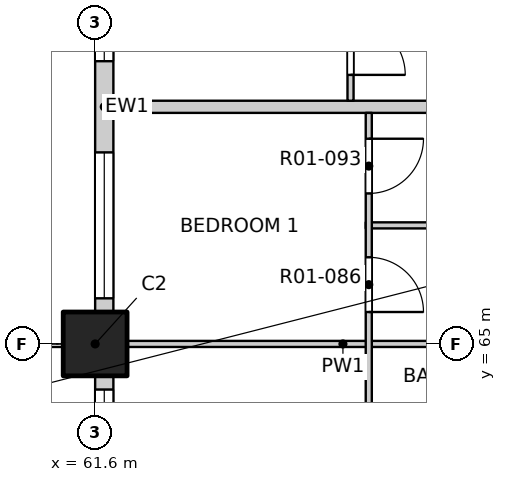
"""IFC4 building model, lengths in metres.
Left out: names, types, materials, properties, quantities, classifications, styles, units other than length and angle.
Written with IfcOpenShell. Run it as: python <this file> out.ifc"""

import sys

from ifc_helpers import new_model, si_unit, direction, frame, frame_2d, origin, origin_2d, place, context, subcontext, project, spatial, rectangle, extrude, element, fill, save


model = new_model("IFC4")
c1 = context("Model", 3, precision=1e-05, world=origin(), true_north=direction((0.0, 1.0)))
c2 = subcontext(c1, "Body", "Model", "MODEL_VIEW")
j1 = project(units=[si_unit("LENGTHUNIT", "METRE"), si_unit("PLANEANGLEUNIT", "RADIAN")], contexts=[c1])
p1 = place(None, origin())
s1 = spatial("IfcSite", under=j1, at=p1, CompositionType="ELEMENT")
p2 = place(p1, origin())
s2 = spatial("IfcBuilding", under=s1, at=p2, CompositionType="ELEMENT")
p3 = place(p2, frame((0.0, 0.0, 26.3)))
s3 = spatial("IfcBuildingStorey", under=s2, at=p3, CompositionType="ELEMENT", Elevation=26.3)
p4 = place(p3, frame((61.6, 65.0, -0.25), z_axis=(0.0, 0.0, 1.0), x_axis=(1.0, 0.0, 0.0)))
e1 = element("IfcColumn", 1, at=p4, inside=s3, PredefinedType="COLUMN", context=c2, shape_type="SweptSolid", body=[
    extrude(rectangle(XDim=1.05, YDim=1.05, at=origin_2d()), origin(), (0.0, 0.0, 1.0), 3.4),
])
p5 = place(p3, frame((61.75, 57.725, 0.0), z_axis=(0.0, 0.0, 1.0), x_axis=(0.0, 1.0, 0.0)))
e2 = element("IfcWall", 2, at=p5, inside=s3, PredefinedType="SOLIDWALL", context=c2, shape_type="SweptSolid", body=[
    extrude(rectangle(XDim=6.75, YDim=0.3, at=frame_2d((3.375, 0.0))), origin(), (0.0, 0.0, 1.0), 2.7),
])
p6 = place(p5, frame((0.525, 0.0, 0.0)))
e3 = element("IfcOpeningElement", 3, at=p6, cuts=e2, PredefinedType="OPENING", context=c2, shape_type="SweptSolid", body=[
    extrude(rectangle(XDim=1.8, YDim=2.4, at=frame_2d((0.9, 1.2))), frame((0.0, 0.16, 0.0), z_axis=(0.0, -1.0, 0.0), x_axis=(1.0, 0.0, 0.0)), (0.0, 0.0, 1.0), 0.32),
])
p7 = place(p5, frame((4.125, 0.0, 0.9)))
e4 = element("IfcOpeningElement", 4, at=p7, cuts=e2, PredefinedType="OPENING", context=c2, shape_type="SweptSolid", body=[
    extrude(rectangle(XDim=2.4, YDim=1.8, at=frame_2d((1.2, 0.9))), frame((0.0, 0.16, 0.0), z_axis=(0.0, -1.0, 0.0), x_axis=(1.0, 0.0, 0.0)), (0.0, 0.0, 1.0), 0.32),
])
p8 = place(p3, frame((61.75, 65.525, 0.0), z_axis=(0.0, 0.0, 1.0), x_axis=(0.0, 1.0, 0.0)))
e5 = element("IfcWall", 5, at=p8, inside=s3, PredefinedType="SOLIDWALL", context=c2, shape_type="SweptSolid", body=[
    extrude(rectangle(XDim=6.75, YDim=0.3, at=frame_2d((3.375, 0.0))), origin(), (0.0, 0.0, 1.0), 2.7),
])
p9 = place(p8, frame((0.225, 0.0, 0.9)))
e6 = element("IfcOpeningElement", 6, at=p9, cuts=e5, PredefinedType="OPENING", context=c2, shape_type="SweptSolid", body=[
    extrude(rectangle(XDim=2.4, YDim=1.8, at=frame_2d((1.2, 0.9))), frame((0.0, 0.16, 0.0), z_axis=(0.0, -1.0, 0.0), x_axis=(1.0, 0.0, 0.0)), (0.0, 0.0, 1.0), 0.32),
])
p10 = place(p8, frame((4.125, 0.0, 0.9)))
e7 = element("IfcOpeningElement", 7, at=p10, cuts=e5, PredefinedType="OPENING", context=c2, shape_type="SweptSolid", body=[
    extrude(rectangle(XDim=2.4, YDim=1.8, at=frame_2d((1.2, 0.9))), frame((0.0, 0.16, 0.0), z_axis=(0.0, -1.0, 0.0), x_axis=(1.0, 0.0, 0.0)), (0.0, 0.0, 1.0), 0.32),
])
p11 = place(p3, frame((61.9, 65.0, 0.0), z_axis=(0.0, 0.0, 1.0), x_axis=(1.0, 0.0, 0.0)))
e8 = element("IfcWall", 8, at=p11, inside=s3, PredefinedType="PARTITIONING", context=c2, shape_type="SweptSolid", body=[
    extrude(rectangle(XDim=7.55, YDim=0.1, at=frame_2d((3.775, 0.0))), origin(), (0.0, 0.0, 1.0), 2.55),
])
p12 = place(p3, frame((66.05, 66.95, 0.0), z_axis=(0.0, 0.0, 1.0), x_axis=(1.0, 0.0, 0.0)))
e9 = element("IfcWall", 9, at=p12, inside=s3, PredefinedType="PARTITIONING", context=c2, shape_type="SweptSolid", body=[
    extrude(rectangle(XDim=3.4, YDim=0.1, at=frame_2d((1.7, 0.0))), origin(), (0.0, 0.0, 1.0), 3.15),
])
p13 = place(p3, frame((61.9, 68.9, 0.0), z_axis=(0.0, 0.0, 1.0), x_axis=(1.0, 0.0, 0.0)))
e10 = element("IfcWall", 10, at=p13, inside=s3, PredefinedType="PARTITIONING", context=c2, shape_type="SweptSolid", body=[
    extrude(rectangle(XDim=11.5, YDim=0.2, at=frame_2d((5.75, 0.0))), origin(), (0.0, 0.0, 1.0), 3.15),
])
p14 = place(p3, frame((65.8, 69.0, 0.0), z_axis=(0.0, 0.0, 1.0), x_axis=(0.0, 1.0, 0.0)))
e11 = element("IfcWall", 11, at=p14, inside=s3, PredefinedType="PARTITIONING", context=c2, shape_type="SweptSolid", body=[
    extrude(rectangle(XDim=7.6, YDim=0.1, at=frame_2d((3.8, 0.0))), origin(), (0.0, 0.0, 1.0), 3.15),
])
p15 = place(p14, frame((0.425, 0.0, 0.0)))
e12 = element("IfcOpeningElement", 12, at=p15, cuts=e11, PredefinedType="OPENING", context=c2, shape_type="SweptSolid", body=[
    extrude(rectangle(XDim=0.9, YDim=2.1, at=frame_2d((0.45, 1.05))), frame((0.0, 0.06, 0.0), z_axis=(0.0, -1.0, 0.0), x_axis=(1.0, 0.0, 0.0)), (0.0, 0.0, 1.0), 0.12),
])
p16 = place(p14, frame((2.375, 0.0, 0.0)))
e13 = element("IfcOpeningElement", 13, at=p16, cuts=e11, PredefinedType="OPENING", context=c2, shape_type="SweptSolid", body=[
    extrude(rectangle(XDim=0.9, YDim=2.1, at=frame_2d((0.45, 1.05))), frame((0.0, 0.06, 0.0), z_axis=(0.0, -1.0, 0.0), x_axis=(1.0, 0.0, 0.0)), (0.0, 0.0, 1.0), 0.12),
])
p17 = place(p14, frame((5.15, 0.0, 0.0)))
e14 = element("IfcOpeningElement", 14, at=p17, cuts=e11, PredefinedType="OPENING", context=c2, shape_type="SweptSolid", body=[
    extrude(rectangle(XDim=1.2, YDim=2.1, at=frame_2d((0.6, 1.05))), frame((0.0, 0.06, 0.0), z_axis=(0.0, -1.0, 0.0), x_axis=(1.0, 0.0, 0.0)), (0.0, 0.0, 1.0), 0.12),
])
p18 = place(p3, frame((66.1, 61.2, 0.0), z_axis=(0.0, 0.0, 1.0), x_axis=(0.0, 1.0, 0.0)))
e15 = element("IfcWall", 15, at=p18, inside=s3, PredefinedType="PARTITIONING", context=c2, shape_type="SweptSolid", body=[
    extrude(rectangle(XDim=7.6, YDim=0.1, at=frame_2d((3.8, 0.0))), origin(), (0.0, 0.0, 1.0), 3.15),
])
p19 = place(p18, frame((1.25, 0.0, 0.0)))
e16 = element("IfcOpeningElement", 16, at=p19, cuts=e15, PredefinedType="OPENING", context=c2, shape_type="SweptSolid", body=[
    extrude(rectangle(XDim=1.2, YDim=2.1, at=frame_2d((0.6, 1.05))), frame((0.0, 0.06, 0.0), z_axis=(0.0, -1.0, 0.0), x_axis=(1.0, 0.0, 0.0)), (0.0, 0.0, 1.0), 0.12),
])
p20 = place(p18, frame((4.325, 0.0, 0.0)))
e17 = element("IfcOpeningElement", 17, at=p20, cuts=e15, PredefinedType="OPENING", context=c2, shape_type="SweptSolid", body=[
    extrude(rectangle(XDim=0.9, YDim=2.1, at=frame_2d((0.45, 1.05))), frame((0.0, 0.06, 0.0), z_axis=(0.0, -1.0, 0.0), x_axis=(1.0, 0.0, 0.0)), (0.0, 0.0, 1.0), 0.12),
])
p21 = place(p18, frame((6.275, 0.0, 0.0)))
e18 = element("IfcOpeningElement", 18, at=p21, cuts=e15, PredefinedType="OPENING", context=c2, shape_type="SweptSolid", body=[
    extrude(rectangle(XDim=0.9, YDim=2.1, at=frame_2d((0.45, 1.05))), frame((0.0, 0.06, 0.0), z_axis=(0.0, -1.0, 0.0), x_axis=(1.0, 0.0, 0.0)), (0.0, 0.0, 1.0), 0.12),
])
p22 = place(p7, origin())
e19 = element("IfcWindow", 19, at=p22, inside=s3, PartitioningType="DOUBLE_PANEL_VERTICAL", PredefinedType="WINDOW", context=c2, shape_type="SweptSolid", body=[
    extrude(rectangle(XDim=2.4, YDim=1.8, at=frame_2d((1.2, 0.9))), frame((0.0, 0.03, 0.0), z_axis=(0.0, -1.0, 0.0), x_axis=(1.0, 0.0, 0.0)), (0.0, 0.0, 1.0), 0.06),
])
fill(e4, e19)
p23 = place(p9, origin())
e20 = element("IfcWindow", 20, at=p23, inside=s3, PartitioningType="DOUBLE_PANEL_VERTICAL", PredefinedType="WINDOW", context=c2, shape_type="SweptSolid", body=[
    extrude(rectangle(XDim=2.4, YDim=1.8, at=frame_2d((1.2, 0.9))), frame((0.0, 0.03, 0.0), z_axis=(0.0, -1.0, 0.0), x_axis=(1.0, 0.0, 0.0)), (0.0, 0.0, 1.0), 0.06),
])
fill(e6, e20)
p24 = place(p10, origin())
e21 = element("IfcWindow", 21, at=p24, inside=s3, PartitioningType="DOUBLE_PANEL_VERTICAL", PredefinedType="WINDOW", context=c2, shape_type="SweptSolid", body=[
    extrude(rectangle(XDim=2.4, YDim=1.8, at=frame_2d((1.2, 0.9))), frame((0.0, 0.03, 0.0), z_axis=(0.0, -1.0, 0.0), x_axis=(1.0, 0.0, 0.0)), (0.0, 0.0, 1.0), 0.06),
])
fill(e7, e21)
p25 = place(p20, origin())
e22 = element("IfcDoor", 22, at=p25, inside=s3, OperationType="SINGLE_SWING_RIGHT", PredefinedType="DOOR", context=c2, shape_type="SweptSolid", body=[
    extrude(rectangle(XDim=0.9, YDim=2.1, at=frame_2d((0.45, 1.05))), frame((0.0, 0.025, 0.0), z_axis=(0.0, -1.0, 0.0), x_axis=(1.0, 0.0, 0.0)), (0.0, 0.0, 1.0), 0.05),
])
fill(e17, e22)
p26 = place(p21, origin())
e23 = element("IfcDoor", 23, at=p26, inside=s3, OperationType="SINGLE_SWING_LEFT", PredefinedType="DOOR", context=c2, shape_type="SweptSolid", body=[
    extrude(rectangle(XDim=0.9, YDim=2.1, at=frame_2d((0.45, 1.05))), frame((0.0, 0.025, 0.0), z_axis=(0.0, -1.0, 0.0), x_axis=(1.0, 0.0, 0.0)), (0.0, 0.0, 1.0), 0.05),
])
fill(e18, e23)
p27 = place(p15, origin())
e24 = element("IfcDoor", 24, at=p27, inside=s3, OperationType="SINGLE_SWING_RIGHT", PredefinedType="DOOR", context=c2, shape_type="SweptSolid", body=[
    extrude(rectangle(XDim=0.9, YDim=2.1, at=frame_2d((0.45, 1.05))), frame((0.0, 0.025, 0.0), z_axis=(0.0, -1.0, 0.0), x_axis=(1.0, 0.0, 0.0)), (0.0, 0.0, 1.0), 0.05),
])
fill(e12, e24)
save(model, sys.argv[1])
